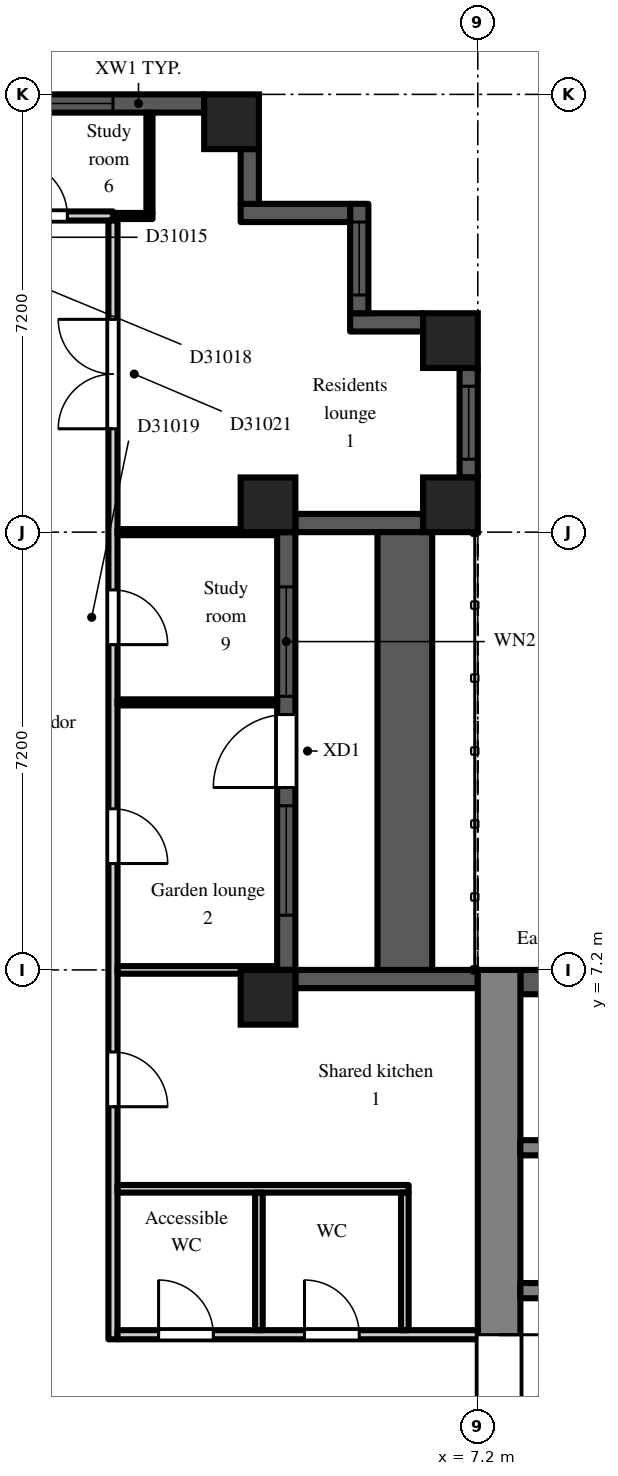
"""IFC4 building model, lengths in metres.
Left out: names, types, materials, properties, quantities, classifications, styles, units other than length and angle.
Written with IfcOpenShell. Run it as: python <this file> out.ifc"""

import sys

from ifc_helpers import new_model, si_unit, direction, frame, frame_2d, origin, origin_2d, place, context, subcontext, project, spatial, rectangle, extrude, element, fill, save


model = new_model("IFC4")
c1 = context("Model", 3, precision=1e-05, world=origin(), true_north=direction((0.0, 1.0)))
c2 = subcontext(c1, "Body", "Model", "MODEL_VIEW")
j1 = project(units=[si_unit("LENGTHUNIT", "METRE"), si_unit("PLANEANGLEUNIT", "RADIAN")], contexts=[c1])
p1 = place(None, origin())
s1 = spatial("IfcSite", under=j1, at=p1, CompositionType="ELEMENT")
p2 = place(p1, origin())
s2 = spatial("IfcBuilding", under=s1, at=p2, CompositionType="ELEMENT")
p3 = place(p2, frame((0.0, 0.0, 216.9)))
s3 = spatial("IfcBuildingStorey", under=s2, at=p3, CompositionType="ELEMENT", Elevation=216.9)
for number, where, z_axis, x_axis in (
    (1, (3.15, 21.15, 0.0), (0.0, 0.0, 1.0), (1.0, 0.0, 0.0)),
    (2, (3.75, 6.75, 0.0), (0.0, 0.0, 1.0), (1.0, 0.0, 0.0)),
    (3, (3.75, 14.85, 0.0), (0.0, 0.0, 1.0), (1.0, 0.0, 0.0)),
    (4, (6.75, 14.85, 0.0), (0.0, 0.0, 1.0), (1.0, 0.0, 0.0)),
    (5, (6.75, 17.55, 0.0), (0.0, 0.0, 1.0), (1.0, 0.0, 0.0)),
):
    element("IfcColumn", number, at=place(p3, frame(where, z_axis=z_axis, x_axis=x_axis)), inside=s3, PredefinedType="COLUMN", context=c2, shape_type="SweptSolid", body=[
        extrude(rectangle(XDim=0.9, YDim=0.9, at=origin_2d()), origin(), (0.0, 0.0, 1.0), 3.0),
    ])
p4 = place(p3, frame((7.2, 7.05, 0.0), z_axis=(0.0, 0.0, 1.0), x_axis=(-1.0, 0.0, 0.0)))
e6 = element("IfcWall", 6, at=p4, inside=s3, PredefinedType="SOLIDWALL", context=c2, shape_type="SweptSolid", body=[
    extrude(rectangle(XDim=3.0, YDim=0.3, at=frame_2d((1.5, 0.0))), origin(), (0.0, 0.0, 1.0), 2.3),
])
p5 = place(p3, frame((4.05, 7.2, 0.0), z_axis=(0.0, 0.0, 1.0), x_axis=(0.0, 1.0, 0.0)))
e7 = element("IfcWall", 7, at=p5, inside=s3, PredefinedType="SOLIDWALL", context=c2, shape_type="SweptSolid", body=[
    extrude(rectangle(XDim=7.2, YDim=0.3, at=frame_2d((3.6, 0.0))), origin(), (0.0, 0.0, 1.0), 2.3),
])
p6 = place(p5, frame((3.0, 0.0, 0.0)))
e8 = element("IfcOpeningElement", 8, at=p6, cuts=e7, PredefinedType="OPENING", context=c2, shape_type="SweptSolid", body=[
    extrude(rectangle(XDim=1.2, YDim=2.05, at=frame_2d((0.6, 1.025))), frame((0.0, 0.16, 0.0), z_axis=(0.0, -1.0, 0.0), x_axis=(1.0, 0.0, 0.0)), (0.0, 0.0, 1.0), 0.32),
])
p7 = place(p5, frame((0.9, 0.0, 0.2)))
e9 = element("IfcOpeningElement", 9, at=p7, cuts=e7, PredefinedType="OPENING", context=c2, shape_type="SweptSolid", body=[
    extrude(rectangle(XDim=1.8, YDim=1.85, at=frame_2d((0.9, 0.925))), frame((0.0, 0.16, 0.0), z_axis=(0.0, -1.0, 0.0), x_axis=(1.0, 0.0, 0.0)), (0.0, 0.0, 1.0), 0.32),
])
p8 = place(p5, frame((4.5, 0.0, 0.2)))
e10 = element("IfcOpeningElement", 10, at=p8, cuts=e7, PredefinedType="OPENING", context=c2, shape_type="SweptSolid", body=[
    extrude(rectangle(XDim=1.8, YDim=1.85, at=frame_2d((0.9, 0.925))), frame((0.0, 0.16, 0.0), z_axis=(0.0, -1.0, 0.0), x_axis=(1.0, 0.0, 0.0)), (0.0, 0.0, 1.0), 0.32),
])
p9 = place(p3, frame((4.2, 14.55, 0.0), z_axis=(0.0, 0.0, 1.0), x_axis=(1.0, 0.0, 0.0)))
e11 = element("IfcWall", 11, at=p9, inside=s3, PredefinedType="SOLIDWALL", context=c2, shape_type="SweptSolid", body=[
    extrude(rectangle(XDim=2.1, YDim=0.3, at=frame_2d((1.05, 0.0))), origin(), (0.0, 0.0, 1.0), 2.3),
])
p10 = place(p3, frame((7.05, 15.3, 0.0), z_axis=(0.0, 0.0, 1.0), x_axis=(0.0, 1.0, 0.0)))
e12 = element("IfcWall", 12, at=p10, inside=s3, PredefinedType="SOLIDWALL", context=c2, shape_type="SweptSolid", body=[
    extrude(rectangle(XDim=1.8, YDim=0.3, at=frame_2d((0.9, 0.0))), origin(), (0.0, 0.0, 1.0), 2.3),
])
p11 = place(p10, frame((0.3, 0.0, 0.2)))
e13 = element("IfcOpeningElement", 13, at=p11, cuts=e12, PredefinedType="OPENING", context=c2, shape_type="SweptSolid", body=[
    extrude(rectangle(XDim=1.2, YDim=1.85, at=frame_2d((0.6, 0.925))), frame((0.0, 0.16, 0.0), z_axis=(0.0, -1.0, 0.0), x_axis=(1.0, 0.0, 0.0)), (0.0, 0.0, 1.0), 0.32),
])
p12 = place(p3, frame((6.3, 17.85, 0.0), z_axis=(0.0, 0.0, 1.0), x_axis=(-1.0, 0.0, 0.0)))
e14 = element("IfcWall", 14, at=p12, inside=s3, PredefinedType="SOLIDWALL", context=c2, shape_type="SweptSolid", body=[
    extrude(rectangle(XDim=1.2, YDim=0.3, at=frame_2d((0.6, 0.0))), origin(), (0.0, 0.0, 1.0), 2.6),
])
p13 = place(p3, frame((5.25, 18.0, 0.0), z_axis=(0.0, 0.0, 1.0), x_axis=(0.0, 1.0, 0.0)))
e15 = element("IfcWall", 15, at=p13, inside=s3, PredefinedType="SOLIDWALL", context=c2, shape_type="SweptSolid", body=[
    extrude(rectangle(XDim=1.8, YDim=0.3, at=frame_2d((0.9, 0.0))), origin(), (0.0, 0.0, 1.0), 2.6),
])
p14 = place(p13, frame((0.3, 0.0, 0.2)))
e16 = element("IfcOpeningElement", 16, at=p14, cuts=e15, PredefinedType="OPENING", context=c2, shape_type="SweptSolid", body=[
    extrude(rectangle(XDim=1.2, YDim=1.85, at=frame_2d((0.6, 0.925))), frame((0.0, 0.16, 0.0), z_axis=(0.0, -1.0, 0.0), x_axis=(1.0, 0.0, 0.0)), (0.0, 0.0, 1.0), 0.32),
])
p15 = place(p3, frame((5.1, 19.65, 0.0), z_axis=(0.0, 0.0, 1.0), x_axis=(-1.0, 0.0, 0.0)))
e17 = element("IfcWall", 17, at=p15, inside=s3, PredefinedType="SOLIDWALL", context=c2, shape_type="SweptSolid", body=[
    extrude(rectangle(XDim=1.8, YDim=0.3, at=frame_2d((0.9, 0.0))), origin(), (0.0, 0.0, 1.0), 2.6),
])
p16 = place(p3, frame((3.45, 19.8, 0.0), z_axis=(0.0, 0.0, 1.0), x_axis=(0.0, 1.0, 0.0)))
e18 = element("IfcWall", 18, at=p16, inside=s3, PredefinedType="SOLIDWALL", context=c2, shape_type="SweptSolid", body=[
    extrude(rectangle(XDim=0.9, YDim=0.3, at=frame_2d((0.45, 0.0))), origin(), (0.0, 0.0, 1.0), 2.6),
])
p17 = place(p3, frame((2.7, 21.45, 0.0), z_axis=(0.0, 0.0, 1.0), x_axis=(-1.0, 0.0, 0.0)))
e19 = element("IfcWall", 19, at=p17, inside=s3, PredefinedType="SOLIDWALL", context=c2, shape_type="SweptSolid", body=[
    extrude(rectangle(XDim=5.4, YDim=0.3, at=frame_2d((2.7, 0.0))), origin(), (0.0, 0.0, 1.0), 2.3),
])
p18 = place(p17, frame((1.5, 0.0, 0.2)))
e20 = element("IfcOpeningElement", 20, at=p18, cuts=e19, PredefinedType="OPENING", context=c2, shape_type="SweptSolid", body=[
    extrude(rectangle(XDim=2.4, YDim=1.85, at=frame_2d((1.2, 0.925))), frame((0.0, 0.16, 0.0), z_axis=(0.0, -1.0, 0.0), x_axis=(1.0, 0.0, 0.0)), (0.0, 0.0, 1.0), 0.32),
])
p19 = place(p3, frame((6.0, 7.2, 0.0), z_axis=(0.0, 0.0, 1.0), x_axis=(0.0, 1.0, 0.0)))
e21 = element("IfcWall", 21, at=p19, inside=s3, PredefinedType="PARAPET", context=c2, shape_type="SweptSolid", body=[
    extrude(rectangle(XDim=7.2, YDim=0.9, at=frame_2d((3.6, 0.0))), origin(), (0.0, 0.0, 1.0), 0.8),
])
p20 = place(p3, frame((7.55, -7.2, 0.0), z_axis=(0.0, 0.0, 1.0), x_axis=(0.0, 1.0, 0.0)))
e22 = element("IfcWall", 22, at=p20, inside=s3, PredefinedType="SHEAR", context=c2, shape_type="SweptSolid", body=[
    extrude(rectangle(XDim=14.4, YDim=0.7, at=frame_2d((7.2, 0.0))), origin(), (0.0, 0.0, 1.0), 2.6),
])
p21 = place(p20, frame((6.0, 0.0, 0.0)))
e23 = element("IfcOpeningElement", 23, at=p21, cuts=e22, PredefinedType="OPENING", context=c2, shape_type="SweptSolid", body=[
    extrude(rectangle(XDim=2.4, YDim=2.2, at=frame_2d((1.2, 1.1))), frame((0.0, 0.36, 0.0), z_axis=(0.0, -1.0, 0.0), x_axis=(1.0, 0.0, 0.0)), (0.0, 0.0, 1.0), 0.72),
])
p22 = place(p3, frame((7.9, 7.0, 0.0), z_axis=(0.0, 0.0, 1.0), x_axis=(1.0, 0.0, 0.0)))
e24 = element("IfcWall", 24, at=p22, inside=s3, PredefinedType="SHEAR", context=c2, shape_type="SweptSolid", body=[
    extrude(rectangle(XDim=12.95, YDim=0.4, at=frame_2d((6.475, 0.0))), origin(), (0.0, 0.0, 1.0), 2.6),
])
p23 = place(p3, frame((7.9, 1.925, 0.0), z_axis=(0.0, 0.0, 1.0), x_axis=(1.0, 0.0, 0.0)))
e25 = element("IfcWall", 25, at=p23, inside=s3, PredefinedType="SHEAR", context=c2, shape_type="SweptSolid", body=[
    extrude(rectangle(XDim=12.95, YDim=0.25, at=frame_2d((6.475, 0.0))), origin(), (0.0, 0.0, 1.0), 2.6),
])
p24 = place(p23, frame((4.825, 0.0, 0.0)))
e26 = element("IfcOpeningElement", 26, at=p24, cuts=e25, PredefinedType="OPENING", context=c2, shape_type="SweptSolid", body=[
    extrude(rectangle(XDim=1.1, YDim=2.1, at=frame_2d((0.55, 1.05))), frame((0.0, 0.135, 0.0), z_axis=(0.0, -1.0, 0.0), x_axis=(1.0, 0.0, 0.0)), (0.0, 0.0, 1.0), 0.27),
])
p25 = place(p23, frame((7.025, 0.0, 0.0)))
e27 = element("IfcOpeningElement", 27, at=p25, cuts=e25, PredefinedType="OPENING", context=c2, shape_type="SweptSolid", body=[
    extrude(rectangle(XDim=1.1, YDim=2.1, at=frame_2d((0.55, 1.05))), frame((0.0, 0.135, 0.0), z_axis=(0.0, -1.0, 0.0), x_axis=(1.0, 0.0, 0.0)), (0.0, 0.0, 1.0), 0.27),
])
p26 = place(p23, frame((9.225, 0.0, 0.0)))
e28 = element("IfcOpeningElement", 28, at=p26, cuts=e25, PredefinedType="OPENING", context=c2, shape_type="SweptSolid", body=[
    extrude(rectangle(XDim=1.1, YDim=2.1, at=frame_2d((0.55, 1.05))), frame((0.0, 0.135, 0.0), z_axis=(0.0, -1.0, 0.0), x_axis=(1.0, 0.0, 0.0)), (0.0, 0.0, 1.0), 0.27),
])
p27 = place(p23, frame((0.525, 0.0, 0.0)))
e29 = element("IfcOpeningElement", 29, at=p27, cuts=e25, PredefinedType="OPENING", context=c2, shape_type="SweptSolid", body=[
    extrude(rectangle(XDim=0.9, YDim=2.1, at=frame_2d((0.45, 1.05))), frame((0.0, 0.135, 0.0), z_axis=(0.0, -1.0, 0.0), x_axis=(1.0, 0.0, 0.0)), (0.0, 0.0, 1.0), 0.27),
])
p28 = place(p23, frame((2.625, 0.0, 0.0)))
e30 = element("IfcOpeningElement", 30, at=p28, cuts=e25, PredefinedType="OPENING", context=c2, shape_type="SweptSolid", body=[
    extrude(rectangle(XDim=1.1, YDim=2.1, at=frame_2d((0.55, 1.05))), frame((0.0, 0.135, 0.0), z_axis=(0.0, -1.0, 0.0), x_axis=(1.0, 0.0, 0.0)), (0.0, 0.0, 1.0), 0.27),
])
p29 = place(p23, frame((11.525, 0.0, 0.0)))
e31 = element("IfcOpeningElement", 31, at=p29, cuts=e25, PredefinedType="OPENING", context=c2, shape_type="SweptSolid", body=[
    extrude(rectangle(XDim=0.9, YDim=2.1, at=frame_2d((0.45, 1.05))), frame((0.0, 0.135, 0.0), z_axis=(0.0, -1.0, 0.0), x_axis=(1.0, 0.0, 0.0)), (0.0, 0.0, 1.0), 0.27),
])
p30 = place(p3, frame((7.9, 4.275, 0.0), z_axis=(0.0, 0.0, 1.0), x_axis=(1.0, 0.0, 0.0)))
e32 = element("IfcWall", 32, at=p30, inside=s3, PredefinedType="SHEAR", context=c2, shape_type="SweptSolid", body=[
    extrude(rectangle(XDim=1.95, YDim=0.25, at=frame_2d((0.975, 0.0))), origin(), (0.0, 0.0, 1.0), 2.6),
])
p31 = place(p3, frame((-1.2, 19.6, 0.0), z_axis=(0.0, 0.0, 1.0), x_axis=(1.0, 0.0, 0.0)))
e33 = element("IfcWall", 33, at=p31, inside=s3, PredefinedType="PARTITIONING", context=c2, shape_type="SweptSolid", body=[
    extrude(rectangle(XDim=2.4, YDim=0.15, at=frame_2d((1.2, 0.0))), origin(), (0.0, 0.0, 1.0), 2.6),
])
p32 = place(p31, frame((0.75, 0.0, 0.0)))
e34 = element("IfcOpeningElement", 34, at=p32, cuts=e33, PredefinedType="OPENING", context=c2, shape_type="SweptSolid", body=[
    extrude(rectangle(XDim=0.9, YDim=2.1, at=frame_2d((0.45, 1.05))), frame((0.0, 0.085, 0.0), z_axis=(0.0, -1.0, 0.0), x_axis=(1.0, 0.0, 0.0)), (0.0, 0.0, 1.0), 0.17),
])
p33 = place(p3, frame((1.2, 1.125, 0.0), z_axis=(0.0, 0.0, 1.0), x_axis=(0.0, 1.0, 0.0)))
e35 = element("IfcWall", 35, at=p33, inside=s3, PredefinedType="PARTITIONING", context=c2, shape_type="SweptSolid", body=[
    extrude(rectangle(XDim=18.4, YDim=0.15, at=frame_2d((9.2, 0.0))), origin(), (0.0, 0.0, 1.0), 2.6),
])
p34 = place(p33, frame((3.825, 0.0, 0.0)))
e36 = element("IfcOpeningElement", 36, at=p34, cuts=e35, PredefinedType="OPENING", context=c2, shape_type="SweptSolid", body=[
    extrude(rectangle(XDim=0.9, YDim=2.1, at=frame_2d((0.45, 1.05))), frame((0.0, 0.085, 0.0), z_axis=(0.0, -1.0, 0.0), x_axis=(1.0, 0.0, 0.0)), (0.0, 0.0, 1.0), 0.17),
])
p35 = place(p33, frame((11.425, 0.0, 0.0)))
e37 = element("IfcOpeningElement", 37, at=p35, cuts=e35, PredefinedType="OPENING", context=c2, shape_type="SweptSolid", body=[
    extrude(rectangle(XDim=0.9, YDim=2.1, at=frame_2d((0.45, 1.05))), frame((0.0, 0.085, 0.0), z_axis=(0.0, -1.0, 0.0), x_axis=(1.0, 0.0, 0.0)), (0.0, 0.0, 1.0), 0.17),
])
p36 = place(p33, frame((7.825, 0.0, 0.0)))
e38 = element("IfcOpeningElement", 38, at=p36, cuts=e35, PredefinedType="OPENING", context=c2, shape_type="SweptSolid", body=[
    extrude(rectangle(XDim=0.9, YDim=2.1, at=frame_2d((0.45, 1.05))), frame((0.0, 0.085, 0.0), z_axis=(0.0, -1.0, 0.0), x_axis=(1.0, 0.0, 0.0)), (0.0, 0.0, 1.0), 0.17),
])
p37 = place(p33, frame((14.975, 0.0, 0.0)))
e39 = element("IfcOpeningElement", 39, at=p37, cuts=e35, PredefinedType="OPENING", context=c2, shape_type="SweptSolid", body=[
    extrude(rectangle(XDim=1.8, YDim=2.1, at=frame_2d((0.9, 1.05))), frame((0.0, 0.085, 0.0), z_axis=(0.0, -1.0, 0.0), x_axis=(1.0, 0.0, 0.0)), (0.0, 0.0, 1.0), 0.17),
])
p38 = place(p3, frame((1.275, 1.2, 0.0), z_axis=(0.0, 0.0, 1.0), x_axis=(1.0, 0.0, 0.0)))
e40 = element("IfcWall", 40, at=p38, inside=s3, PredefinedType="PARTITIONING", context=c2, shape_type="SweptSolid", body=[
    extrude(rectangle(XDim=5.925, YDim=0.15, at=frame_2d((2.962, 0.0))), origin(), (0.0, 0.0, 1.0), 2.6),
])
p39 = place(p38, frame((0.675, 0.0, 0.0)))
e41 = element("IfcOpeningElement", 41, at=p39, cuts=e40, PredefinedType="OPENING", context=c2, shape_type="SweptSolid", body=[
    extrude(rectangle(XDim=0.9, YDim=2.1, at=frame_2d((0.45, 1.05))), frame((0.0, 0.085, 0.0), z_axis=(0.0, -1.0, 0.0), x_axis=(1.0, 0.0, 0.0)), (0.0, 0.0, 1.0), 0.17),
])
p40 = place(p38, frame((3.075, 0.0, 0.0)))
e42 = element("IfcOpeningElement", 42, at=p40, cuts=e40, PredefinedType="OPENING", context=c2, shape_type="SweptSolid", body=[
    extrude(rectangle(XDim=0.9, YDim=2.1, at=frame_2d((0.45, 1.05))), frame((0.0, 0.085, 0.0), z_axis=(0.0, -1.0, 0.0), x_axis=(1.0, 0.0, 0.0)), (0.0, 0.0, 1.0), 0.17),
])
p41 = place(p3, frame((1.275, 3.6, 0.0), z_axis=(0.0, 0.0, 1.0), x_axis=(1.0, 0.0, 0.0)))
e43 = element("IfcWall", 43, at=p41, inside=s3, PredefinedType="PARTITIONING", context=c2, shape_type="SweptSolid", body=[
    extrude(rectangle(XDim=4.788, YDim=0.125, at=frame_2d((2.394, 0.0))), origin(), (0.0, 0.0, 1.0), 2.6),
])
p42 = place(p3, frame((1.275, 7.2, 0.0), z_axis=(0.0, 0.0, 1.0), x_axis=(1.0, 0.0, 0.0)))
e44 = element("IfcWall", 44, at=p42, inside=s3, PredefinedType="PARTITIONING", context=c2, shape_type="SweptSolid", body=[
    extrude(rectangle(XDim=2.625, YDim=0.125, at=frame_2d((1.312, 0.0))), origin(), (0.0, 0.0, 1.0), 2.6),
])
for number, where, z_axis, x_axis in (
    (45, (1.275, 11.6, 0.0), (0.0, 0.0, 1.0), (1.0, 0.0, 0.0)),
    (46, (1.275, 14.4, 0.0), (0.0, 0.0, 1.0), (1.0, 0.0, 0.0)),
):
    element("IfcWall", number, at=place(p3, frame(where, z_axis=z_axis, x_axis=x_axis)), inside=s3, PredefinedType="PARTITIONING", context=c2, shape_type="SweptSolid", body=[
        extrude(rectangle(XDim=2.625, YDim=0.1, at=frame_2d((1.312, 0.0))), origin(), (0.0, 0.0, 1.0), 2.6),
    ])
p43 = place(p3, frame((1.2, 19.6, 0.0), z_axis=(0.0, 0.0, 1.0), x_axis=(1.0, 0.0, 0.0)))
e47 = element("IfcWall", 47, at=p43, inside=s3, PredefinedType="PARTITIONING", context=c2, shape_type="SweptSolid", body=[
    extrude(rectangle(XDim=0.65, YDim=0.1, at=frame_2d((0.325, 0.0))), origin(), (0.0, 0.0, 1.0), 2.6),
])
p44 = place(p3, frame((1.8, 19.65, 0.0), z_axis=(0.0, 0.0, 1.0), x_axis=(0.0, 1.0, 0.0)))
e48 = element("IfcWall", 48, at=p44, inside=s3, PredefinedType="PARTITIONING", context=c2, shape_type="SweptSolid", body=[
    extrude(rectangle(XDim=1.65, YDim=0.1, at=frame_2d((0.825, 0.0))), origin(), (0.0, 0.0, 1.0), 2.6),
])
for number, where, z_axis, x_axis in (
    (49, (3.6, 1.275, 0.0), (0.0, 0.0, 1.0), (0.0, 1.0, 0.0)),
    (50, (6.0, 1.275, 0.0), (0.0, 0.0, 1.0), (0.0, 1.0, 0.0)),
):
    element("IfcWall", number, at=place(p3, frame(where, z_axis=z_axis, x_axis=x_axis)), inside=s3, PredefinedType="PARTITIONING", context=c2, shape_type="SweptSolid", body=[
        extrude(rectangle(XDim=2.263, YDim=0.125, at=frame_2d((1.131, 0.0))), origin(), (0.0, 0.0, 1.0), 2.6),
    ])
p45 = place(p6, origin())
e51 = element("IfcDoor", 51, at=p45, inside=s3, OperationType="SINGLE_SWING_LEFT", PredefinedType="DOOR", context=c2, shape_type="SweptSolid", body=[
    extrude(rectangle(XDim=1.2, YDim=2.05, at=frame_2d((0.6, 1.025))), frame((0.0, 0.025, 0.0), z_axis=(0.0, -1.0, 0.0), x_axis=(1.0, 0.0, 0.0)), (0.0, 0.0, 1.0), 0.05),
])
fill(e8, e51)
p46 = place(p7, origin())
e52 = element("IfcWindow", 52, at=p46, inside=s3, PartitioningType="SINGLE_PANEL", PredefinedType="WINDOW", context=c2, shape_type="SweptSolid", body=[
    extrude(rectangle(XDim=1.8, YDim=1.85, at=frame_2d((0.9, 0.925))), frame((0.0, 0.03, 0.0), z_axis=(0.0, -1.0, 0.0), x_axis=(1.0, 0.0, 0.0)), (0.0, 0.0, 1.0), 0.06),
])
fill(e9, e52)
p47 = place(p8, origin())
e53 = element("IfcWindow", 53, at=p47, inside=s3, PartitioningType="SINGLE_PANEL", PredefinedType="WINDOW", context=c2, shape_type="SweptSolid", body=[
    extrude(rectangle(XDim=1.8, YDim=1.85, at=frame_2d((0.9, 0.925))), frame((0.0, 0.03, 0.0), z_axis=(0.0, -1.0, 0.0), x_axis=(1.0, 0.0, 0.0)), (0.0, 0.0, 1.0), 0.06),
])
fill(e10, e53)
p48 = place(p11, origin())
e54 = element("IfcWindow", 54, at=p48, inside=s3, PartitioningType="SINGLE_PANEL", PredefinedType="WINDOW", context=c2, shape_type="SweptSolid", body=[
    extrude(rectangle(XDim=1.2, YDim=1.85, at=frame_2d((0.6, 0.925))), frame((0.0, 0.03, 0.0), z_axis=(0.0, -1.0, 0.0), x_axis=(1.0, 0.0, 0.0)), (0.0, 0.0, 1.0), 0.06),
])
fill(e13, e54)
p49 = place(p14, origin())
e55 = element("IfcWindow", 55, at=p49, inside=s3, PartitioningType="SINGLE_PANEL", PredefinedType="WINDOW", context=c2, shape_type="SweptSolid", body=[
    extrude(rectangle(XDim=1.2, YDim=1.85, at=frame_2d((0.6, 0.925))), frame((0.0, 0.03, 0.0), z_axis=(0.0, -1.0, 0.0), x_axis=(1.0, 0.0, 0.0)), (0.0, 0.0, 1.0), 0.06),
])
fill(e16, e55)
p50 = place(p18, origin())
e56 = element("IfcWindow", 56, at=p50, inside=s3, PartitioningType="SINGLE_PANEL", PredefinedType="WINDOW", context=c2, shape_type="SweptSolid", body=[
    extrude(rectangle(XDim=2.4, YDim=1.85, at=frame_2d((1.2, 0.925))), frame((0.0, 0.03, 0.0), z_axis=(0.0, -1.0, 0.0), x_axis=(1.0, 0.0, 0.0)), (0.0, 0.0, 1.0), 0.06),
])
fill(e20, e56)
p51 = place(p21, frame((2.4, 0.0, 0.0), z_axis=(0.0, 0.0, 1.0), x_axis=(-1.0, 0.0, 0.0)))
e57 = element("IfcDoor", 57, at=p51, inside=s3, OperationType="DOUBLE_DOOR_DOUBLE_SWING", PredefinedType="DOOR", context=c2, shape_type="SweptSolid", body=[
    extrude(rectangle(XDim=2.4, YDim=2.2, at=frame_2d((1.2, 1.1))), frame((0.0, 0.025, 0.0), z_axis=(0.0, -1.0, 0.0), x_axis=(1.0, 0.0, 0.0)), (0.0, 0.0, 1.0), 0.05),
])
fill(e23, e57)
p52 = place(p39, origin())
e58 = element("IfcDoor", 58, at=p52, inside=s3, OperationType="SINGLE_SWING_LEFT", PredefinedType="DOOR", context=c2, shape_type="SweptSolid", body=[
    extrude(rectangle(XDim=0.9, YDim=2.1, at=frame_2d((0.45, 1.05))), frame((0.0, 0.025, 0.0), z_axis=(0.0, -1.0, 0.0), x_axis=(1.0, 0.0, 0.0)), (0.0, 0.0, 1.0), 0.05),
])
fill(e41, e58)
p53 = place(p40, origin())
e59 = element("IfcDoor", 59, at=p53, inside=s3, OperationType="SINGLE_SWING_LEFT", PredefinedType="DOOR", context=c2, shape_type="SweptSolid", body=[
    extrude(rectangle(XDim=0.9, YDim=2.1, at=frame_2d((0.45, 1.05))), frame((0.0, 0.025, 0.0), z_axis=(0.0, -1.0, 0.0), x_axis=(1.0, 0.0, 0.0)), (0.0, 0.0, 1.0), 0.05),
])
fill(e42, e59)
p54 = place(p34, frame((0.9, 0.0, 0.0), z_axis=(0.0, 0.0, 1.0), x_axis=(-1.0, 0.0, 0.0)))
e60 = element("IfcDoor", 60, at=p54, inside=s3, OperationType="SINGLE_SWING_RIGHT", PredefinedType="DOOR", context=c2, shape_type="SweptSolid", body=[
    extrude(rectangle(XDim=0.9, YDim=2.1, at=frame_2d((0.45, 1.05))), frame((0.0, 0.025, 0.0), z_axis=(0.0, -1.0, 0.0), x_axis=(1.0, 0.0, 0.0)), (0.0, 0.0, 1.0), 0.05),
])
fill(e36, e60)
p55 = place(p32, origin())
e61 = element("IfcDoor", 61, at=p55, inside=s3, OperationType="SINGLE_SWING_LEFT", PredefinedType="DOOR", context=c2, shape_type="SweptSolid", body=[
    extrude(rectangle(XDim=0.9, YDim=2.1, at=frame_2d((0.45, 1.05))), frame((0.0, 0.025, 0.0), z_axis=(0.0, -1.0, 0.0), x_axis=(1.0, 0.0, 0.0)), (0.0, 0.0, 1.0), 0.05),
])
fill(e34, e61)
p56 = place(p35, frame((0.9, 0.0, 0.0), z_axis=(0.0, 0.0, 1.0), x_axis=(-1.0, 0.0, 0.0)))
e62 = element("IfcDoor", 62, at=p56, inside=s3, OperationType="SINGLE_SWING_RIGHT", PredefinedType="DOOR", context=c2, shape_type="SweptSolid", body=[
    extrude(rectangle(XDim=0.9, YDim=2.1, at=frame_2d((0.45, 1.05))), frame((0.0, 0.025, 0.0), z_axis=(0.0, -1.0, 0.0), x_axis=(1.0, 0.0, 0.0)), (0.0, 0.0, 1.0), 0.05),
])
fill(e37, e62)
p57 = place(p36, frame((0.9, 0.0, 0.0), z_axis=(0.0, 0.0, 1.0), x_axis=(-1.0, 0.0, 0.0)))
e63 = element("IfcDoor", 63, at=p57, inside=s3, OperationType="SINGLE_SWING_RIGHT", PredefinedType="DOOR", context=c2, shape_type="SweptSolid", body=[
    extrude(rectangle(XDim=0.9, YDim=2.1, at=frame_2d((0.45, 1.05))), frame((0.0, 0.025, 0.0), z_axis=(0.0, -1.0, 0.0), x_axis=(1.0, 0.0, 0.0)), (0.0, 0.0, 1.0), 0.05),
])
fill(e38, e63)
p58 = place(p37, origin())
e64 = element("IfcDoor", 64, at=p58, inside=s3, OperationType="DOUBLE_DOOR_DOUBLE_SWING", PredefinedType="DOOR", context=c2, shape_type="SweptSolid", body=[
    extrude(rectangle(XDim=1.8, YDim=2.1, at=frame_2d((0.9, 1.05))), frame((0.0, 0.025, 0.0), z_axis=(0.0, -1.0, 0.0), x_axis=(1.0, 0.0, 0.0)), (0.0, 0.0, 1.0), 0.05),
])
fill(e39, e64)
save(model, sys.argv[1])
